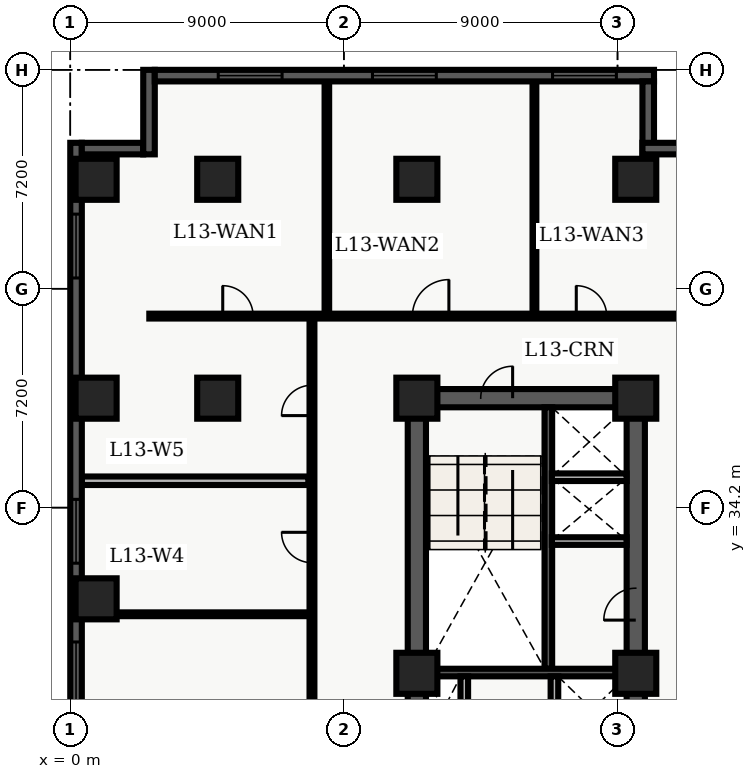
"""IFC4 building model, lengths in metres.
Left out: names, types, materials, properties, quantities, classifications, styles, units other than length and angle.
Written with IfcOpenShell. Run it as: python <this file> out.ifc"""

import sys

from ifc_helpers import new_model, entity, si_unit, converted_unit, direction, frame, origin_with_axes, origin_2d_with_axis, place, context, subcontext, project, spatial, polyline, rectangle, outline, extrude, element, fill, save


model = new_model("IFC4")
c1 = context("Model", 3, precision=1e-05, world=origin_with_axes(), true_north=direction((0.0, 1.0)))
c2 = subcontext(c1, "Body", "Model", "MODEL_VIEW")
j1 = project(units=[si_unit("LENGTHUNIT", "METRE"), converted_unit("PLANEANGLEUNIT", "DEGREE", entity("IfcPlaneAngleMeasure", 0.017), si_unit("PLANEANGLEUNIT", "RADIAN"), dimensions=[0, 0, 0, 0, 0, 0, 0])], contexts=[c1])
p1 = place(None, origin_with_axes())
s1 = spatial("IfcSite", under=j1, at=p1, CompositionType="ELEMENT")
p2 = place(p1, origin_with_axes())
s2 = spatial("IfcBuilding", under=s1, at=p2, CompositionType="ELEMENT")
p3 = place(p2, frame((0.0, 0.0, 56.1), z_axis=(0.0, 0.0, 1.0), x_axis=(1.0, 0.0, 0.0)))
s3 = spatial("IfcBuildingStorey", under=s2, at=p3, CompositionType="ELEMENT", Elevation=56.1)
p4 = place(p3, frame((11.4, 10.8, 0.0), z_axis=(0.0, 0.0, 1.0), x_axis=(0.0, 1.0, 0.0)))
e1 = element("IfcWall", 1, at=p4, inside=s3, PredefinedType="SHEAR", context=c2, shape_type="SweptSolid", body=[
    extrude(outline(polyline([(0.0, -0.3), (27.0, -0.3), (27.0, 0.3), (0.0, 0.3), (0.0, -0.3)])), origin_with_axes(), (0.0, 0.0, 1.0), 3.66),
])
p5 = place(p3, frame((11.4, 37.8, 0.0), z_axis=(0.0, 0.0, 1.0), x_axis=(1.0, 0.0, 0.0)))
e2 = element("IfcWall", 2, at=p5, inside=s3, PredefinedType="SHEAR", context=c2, shape_type="SweptSolid", body=[
    extrude(outline(polyline([(0.0, -0.3), (7.2, -0.3), (7.2, 0.3), (0.0, 0.3), (0.0, -0.3)])), origin_with_axes(), (0.0, 0.0, 1.0), 3.66),
])
p6 = place(p5, frame((2.625, 0.0, 0.0), z_axis=(0.0, 0.0, 1.0), x_axis=(1.0, 0.0, 0.0)))
e3 = element("IfcOpeningElement", 3, at=p6, cuts=e2, PredefinedType="OPENING", context=c2, shape_type="SweptSolid", body=[
    extrude(rectangle(XDim=1.05, YDim=0.62, at=origin_2d_with_axis()), origin_with_axes(), (0.0, 0.0, 1.0), 2.15),
])
p7 = place(p3, frame((18.6, 24.3, 0.0), z_axis=(0.0, 0.0, 1.0), x_axis=(0.0, 1.0, 0.0)))
e4 = element("IfcWall", 4, at=p7, inside=s3, PredefinedType="SHEAR", context=c2, shape_type="SweptSolid", body=[
    extrude(outline(polyline([(0.0, -0.3), (13.5, -0.3), (13.5, 0.3), (0.0, 0.3), (0.0, -0.3)])), origin_with_axes(), (0.0, 0.0, 1.0), 3.66),
])
p8 = place(p7, frame((6.725, 0.0, 0.0), z_axis=(0.0, 0.0, 1.0), x_axis=(1.0, 0.0, 0.0)))
e5 = element("IfcOpeningElement", 5, at=p8, cuts=e4, PredefinedType="OPENING", context=c2, shape_type="SweptSolid", body=[
    extrude(rectangle(XDim=1.05, YDim=0.62, at=origin_2d_with_axis()), origin_with_axes(), (0.0, 0.0, 1.0), 2.15),
])
p9 = place(p3, frame((15.725, 28.9, 0.0), z_axis=(0.0, 0.0, 1.0), x_axis=(0.0, 1.0, 0.0)))
e6 = element("IfcWall", 6, at=p9, inside=s3, PredefinedType="SHEAR", context=c2, shape_type="SweptSolid", body=[
    extrude(outline(polyline([(0.0, -0.125), (8.6, -0.125), (8.6, 0.125), (0.0, 0.125), (0.0, -0.125)])), origin_with_axes(), (0.0, 0.0, 1.0), 3.66),
])
p10 = place(p3, frame((11.7, 28.775, 0.0), z_axis=(0.0, 0.0, 1.0), x_axis=(1.0, 0.0, 0.0)))
e7 = element("IfcWall", 7, at=p10, inside=s3, PredefinedType="SHEAR", context=c2, shape_type="SweptSolid", body=[
    extrude(outline(polyline([(0.0, -0.125), (6.6, -0.125), (6.6, 0.125), (0.0, 0.125), (0.0, -0.125)])), origin_with_axes(), (0.0, 0.0, 1.0), 3.66),
])
for number, where, z_axis, x_axis in (
    (8, (12.96, 26.45, 0.0), (0.0, 0.0, 1.0), (0.0, 1.0, 0.0)),
    (9, (15.925, 26.45, 0.0), (0.0, 0.0, 1.0), (0.0, 1.0, 0.0)),
):
    element("IfcWall", number, at=place(p3, frame(where, z_axis=z_axis, x_axis=x_axis)), inside=s3, PredefinedType="SOLIDWALL", context=c2, shape_type="SweptSolid", body=[
        extrude(outline(polyline([(0.0, -0.125), (2.2, -0.125), (2.2, 0.125), (0.0, 0.125), (0.0, -0.125)])), origin_with_axes(), (0.0, 0.0, 1.0), 2.7),
    ])
for number, where, z_axis, x_axis in (
    (10, (11.4, 28.75, 0.0), (0.0, 0.0, 1.0), (1.0, 0.0, 0.0)),
    (11, (11.4, 37.8, 0.0), (0.0, 0.0, 1.0), (1.0, 0.0, 0.0)),
    (12, (11.4, 45.0, 0.0), (0.0, 0.0, 1.0), (1.0, 0.0, 0.0)),
    (13, (18.6, 28.75, 0.0), (0.0, 0.0, 1.0), (1.0, 0.0, 0.0)),
    (14, (18.6, 37.8, 0.0), (0.0, 0.0, 1.0), (1.0, 0.0, 0.0)),
    (15, (18.6, 45.0, 0.0), (0.0, 0.0, 1.0), (1.0, 0.0, 0.0)),
    (16, (4.85, 37.8, 0.0), (0.0, 0.0, 1.0), (1.0, 0.0, 0.0)),
    (17, (4.85, 45.0, 0.0), (0.0, 0.0, 1.0), (1.0, 0.0, 0.0)),
    (18, (0.85, 31.2, 0.0), (0.0, 0.0, 1.0), (1.0, 0.0, 0.0)),
    (19, (0.85, 37.8, 0.0), (0.0, 0.0, 1.0), (1.0, 0.0, 0.0)),
    (20, (0.85, 45.0, 0.0), (0.0, 0.0, 1.0), (1.0, 0.0, 0.0)),
):
    element("IfcColumn", number, at=place(p3, frame(where, z_axis=z_axis, x_axis=x_axis)), inside=s3, PredefinedType="COLUMN", context=c2, shape_type="SweptSolid", body=[
        extrude(rectangle(XDim=1.35, YDim=1.35, at=origin_2d_with_axis()), origin_with_axes(), (0.0, 0.0, 1.0), 3.9),
    ])
for number, where, z_axis, x_axis in (
    (21, (15.84, 33.1, 0.0), (0.0, 0.0, 1.0), (1.0, 0.0, 0.0)),
    (22, (15.84, 35.2, 0.0), (0.0, 0.0, 1.0), (1.0, 0.0, 0.0)),
):
    element("IfcWall", number, at=place(p3, frame(where, z_axis=z_axis, x_axis=x_axis)), inside=s3, PredefinedType="SOLIDWALL", context=c2, shape_type="SweptSolid", body=[
        extrude(outline(polyline([(0.0, -0.125), (2.46, -0.125), (2.46, 0.125), (0.0, 0.125), (0.0, -0.125)])), origin_with_axes(), (0.0, 0.0, 1.0), 2.7),
    ])
p11 = place(p3, frame((2.6, 40.5, 0.0), z_axis=(0.0, 0.0, 1.0), x_axis=(1.0, 0.0, 0.0)))
e23 = element("IfcWall", 23, at=p11, inside=s3, PredefinedType="PARTITIONING", context=c2, shape_type="SweptSolid", body=[
    extrude(outline(polyline([(0.0, -0.08), (18.65, -0.08), (18.65, 0.08), (0.0, 0.08), (0.0, -0.08)])), origin_with_axes(), (0.0, 0.0, 1.0), 2.7),
])
p12 = place(p11, frame((2.915, 0.0, 0.0), z_axis=(0.0, 0.0, 1.0), x_axis=(1.0, 0.0, 0.0)))
e24 = element("IfcOpeningElement", 24, at=p12, cuts=e23, PredefinedType="OPENING", context=c2, shape_type="SweptSolid", body=[
    extrude(rectangle(XDim=1.0, YDim=0.18, at=origin_2d_with_axis()), origin_with_axes(), (0.0, 0.0, 1.0), 2.15),
])
p13 = place(p11, frame((9.254, 0.0, 0.0), z_axis=(0.0, 0.0, 1.0), x_axis=(1.0, 0.0, 0.0)))
e25 = element("IfcOpeningElement", 25, at=p13, cuts=e23, PredefinedType="OPENING", context=c2, shape_type="SweptSolid", body=[
    extrude(rectangle(XDim=1.2, YDim=0.18, at=origin_2d_with_axis()), origin_with_axes(), (0.0, 0.0, 1.0), 2.2),
])
p14 = place(p11, frame((14.543, 0.0, 0.0), z_axis=(0.0, 0.0, 1.0), x_axis=(1.0, 0.0, 0.0)))
e26 = element("IfcOpeningElement", 26, at=p14, cuts=e23, PredefinedType="OPENING", context=c2, shape_type="SweptSolid", body=[
    extrude(rectangle(XDim=1.0, YDim=0.18, at=origin_2d_with_axis()), origin_with_axes(), (0.0, 0.0, 1.0), 2.15),
])
p15 = place(p3, frame((7.95, 7.8, 0.0), z_axis=(0.0, 0.0, 1.0), x_axis=(0.0, 1.0, 0.0)))
e27 = element("IfcWall", 27, at=p15, inside=s3, PredefinedType="PARTITIONING", context=c2, shape_type="SweptSolid", body=[
    extrude(outline(polyline([(0.0, -0.08), (32.7, -0.08), (32.7, 0.08), (0.0, 0.08), (0.0, -0.08)])), origin_with_axes(), (0.0, 0.0, 1.0), 2.7),
])
p16 = place(p15, frame((3.166, 0.0, 0.0), z_axis=(0.0, 0.0, 1.0), x_axis=(1.0, 0.0, 0.0)))
e28 = element("IfcOpeningElement", 28, at=p16, cuts=e27, PredefinedType="OPENING", context=c2, shape_type="SweptSolid", body=[
    extrude(rectangle(XDim=1.0, YDim=0.18, at=origin_2d_with_axis()), origin_with_axes(), (0.0, 0.0, 1.0), 2.15),
])
p17 = place(p15, frame((9.986, 0.0, 0.0), z_axis=(0.0, 0.0, 1.0), x_axis=(1.0, 0.0, 0.0)))
e29 = element("IfcOpeningElement", 29, at=p17, cuts=e27, PredefinedType="OPENING", context=c2, shape_type="SweptSolid", body=[
    extrude(rectangle(XDim=1.0, YDim=0.18, at=origin_2d_with_axis()), origin_with_axes(), (0.0, 0.0, 1.0), 2.15),
])
p18 = place(p15, frame((18.332, 0.0, 0.0), z_axis=(0.0, 0.0, 1.0), x_axis=(1.0, 0.0, 0.0)))
e30 = element("IfcOpeningElement", 30, at=p18, cuts=e27, PredefinedType="OPENING", context=c2, shape_type="SweptSolid", body=[
    extrude(rectangle(XDim=1.0, YDim=0.18, at=origin_2d_with_axis()), origin_with_axes(), (0.0, 0.0, 1.0), 2.15),
])
p19 = place(p15, frame((25.088, 0.0, 0.0), z_axis=(0.0, 0.0, 1.0), x_axis=(1.0, 0.0, 0.0)))
e31 = element("IfcOpeningElement", 31, at=p19, cuts=e27, PredefinedType="OPENING", context=c2, shape_type="SweptSolid", body=[
    extrude(rectangle(XDim=1.0, YDim=0.18, at=origin_2d_with_axis()), origin_with_axes(), (0.0, 0.0, 1.0), 2.15),
])
p20 = place(p15, frame((29.927, 0.0, 0.0), z_axis=(0.0, 0.0, 1.0), x_axis=(1.0, 0.0, 0.0)))
e32 = element("IfcOpeningElement", 32, at=p20, cuts=e27, PredefinedType="OPENING", context=c2, shape_type="SweptSolid", body=[
    extrude(rectangle(XDim=1.0, YDim=0.18, at=origin_2d_with_axis()), origin_with_axes(), (0.0, 0.0, 1.0), 2.15),
])
p21 = place(p3, frame((0.375, 30.692, 0.0), z_axis=(0.0, 0.0, 1.0), x_axis=(1.0, 0.0, 0.0)))
e33 = element("IfcWall", 33, at=p21, inside=s3, PredefinedType="PARTITIONING", context=c2, shape_type="SweptSolid", body=[
    extrude(outline(polyline([(0.0, -0.062), (7.455, -0.062), (7.455, 0.062), (0.0, 0.062), (0.0, -0.062)])), origin_with_axes(), (0.0, 0.0, 1.0), 2.7),
])
p22 = place(p3, frame((0.375, 35.084, 0.0), z_axis=(0.0, 0.0, 1.0), x_axis=(1.0, 0.0, 0.0)))
e34 = element("IfcWall", 34, at=p22, inside=s3, PredefinedType="PARTITIONING", context=c2, shape_type="SweptSolid", body=[
    extrude(outline(polyline([(0.0, -0.14), (7.455, -0.14), (7.455, 0.14), (0.0, 0.14), (0.0, -0.14)])), origin_with_axes(), (0.0, 0.0, 1.0), 2.7),
])
p23 = place(p3, frame((8.44, 40.6, 0.0), z_axis=(0.0, 0.0, 1.0), x_axis=(0.0, 1.0, 0.0)))
e35 = element("IfcWall", 35, at=p23, inside=s3, PredefinedType="PARTITIONING", context=c2, shape_type="SweptSolid", body=[
    extrude(outline(polyline([(0.0, -0.075), (7.64, -0.075), (7.64, 0.075), (0.0, 0.075), (0.0, -0.075)])), origin_with_axes(), (0.0, 0.0, 1.0), 2.7),
])
p24 = place(p3, frame((15.267, 40.6, 0.0), z_axis=(0.0, 0.0, 1.0), x_axis=(0.0, 1.0, 0.0)))
e36 = element("IfcWall", 36, at=p24, inside=s3, PredefinedType="PARTITIONING", context=c2, shape_type="SweptSolid", body=[
    extrude(outline(polyline([(0.0, -0.062), (7.64, -0.062), (7.64, 0.062), (0.0, 0.062), (0.0, -0.062)])), origin_with_axes(), (0.0, 0.0, 1.0), 2.7),
])
p25 = place(p3, frame((0.19, 2.78, 0.0), z_axis=(0.0, 0.0, 1.0), x_axis=(0.0, 1.0, 0.0)))
e37 = element("IfcWall", 37, at=p25, inside=s3, PredefinedType="SOLIDWALL", context=c2, shape_type="SweptSolid", body=[
    extrude(outline(polyline([(0.0, -0.19), (43.42, -0.19), (43.42, 0.19), (0.0, 0.19), (0.0, -0.19)])), origin_with_axes(), (0.0, 0.0, 1.0), 3.66),
])
p26 = place(p25, frame((2.946, 0.0, 0.45), z_axis=(0.0, 0.0, 1.0), x_axis=(1.0, 0.0, 0.0)))
e38 = element("IfcOpeningElement", 38, at=p26, cuts=e37, PredefinedType="OPENING", context=c2, shape_type="SweptSolid", body=[
    extrude(rectangle(XDim=2.1, YDim=0.4, at=origin_2d_with_axis()), origin_with_axes(), (0.0, 0.0, 1.0), 2.2),
])
p27 = place(p25, frame((12.778, 0.0, 0.45), z_axis=(0.0, 0.0, 1.0), x_axis=(1.0, 0.0, 0.0)))
e39 = element("IfcOpeningElement", 39, at=p27, cuts=e37, PredefinedType="OPENING", context=c2, shape_type="SweptSolid", body=[
    extrude(rectangle(XDim=2.1, YDim=0.4, at=origin_2d_with_axis()), origin_with_axes(), (0.0, 0.0, 1.0), 2.2),
])
p28 = place(p25, frame((21.71, 0.0, 0.45), z_axis=(0.0, 0.0, 1.0), x_axis=(1.0, 0.0, 0.0)))
e40 = element("IfcOpeningElement", 40, at=p28, cuts=e37, PredefinedType="OPENING", context=c2, shape_type="SweptSolid", body=[
    extrude(rectangle(XDim=2.1, YDim=0.4, at=origin_2d_with_axis()), origin_with_axes(), (0.0, 0.0, 1.0), 2.2),
])
p29 = place(p25, frame((25.951, 0.0, 0.45), z_axis=(0.0, 0.0, 1.0), x_axis=(1.0, 0.0, 0.0)))
e41 = element("IfcOpeningElement", 41, at=p29, cuts=e37, PredefinedType="OPENING", context=c2, shape_type="SweptSolid", body=[
    extrude(rectangle(XDim=2.1, YDim=0.4, at=origin_2d_with_axis()), origin_with_axes(), (0.0, 0.0, 1.0), 2.2),
])
p30 = place(p25, frame((30.642, 0.0, 0.45), z_axis=(0.0, 0.0, 1.0), x_axis=(1.0, 0.0, 0.0)))
e42 = element("IfcOpeningElement", 42, at=p30, cuts=e37, PredefinedType="OPENING", context=c2, shape_type="SweptSolid", body=[
    extrude(rectangle(XDim=2.1, YDim=0.4, at=origin_2d_with_axis()), origin_with_axes(), (0.0, 0.0, 1.0), 2.2),
])
p31 = place(p25, frame((40.024, 0.0, 0.45), z_axis=(0.0, 0.0, 1.0), x_axis=(1.0, 0.0, 0.0)))
e43 = element("IfcOpeningElement", 43, at=p31, cuts=e37, PredefinedType="OPENING", context=c2, shape_type="SweptSolid", body=[
    extrude(rectangle(XDim=2.1, YDim=0.4, at=origin_2d_with_axis()), origin_with_axes(), (0.0, 0.0, 1.0), 2.2),
])
p32 = place(p3, frame((0.38, 46.01, 0.0), z_axis=(0.0, 0.0, 1.0), x_axis=(1.0, 0.0, 0.0)))
e44 = element("IfcWall", 44, at=p32, inside=s3, PredefinedType="SOLIDWALL", context=c2, shape_type="SweptSolid", body=[
    extrude(outline(polyline([(0.0, -0.19), (2.02, -0.19), (2.02, 0.19), (0.0, 0.19), (0.0, -0.19)])), origin_with_axes(), (0.0, 0.0, 1.0), 3.66),
])
p33 = place(p3, frame((2.59, 45.82, 0.0), z_axis=(0.0, 0.0, 1.0), x_axis=(0.0, 1.0, 0.0)))
e45 = element("IfcWall", 45, at=p33, inside=s3, PredefinedType="SOLIDWALL", context=c2, shape_type="SweptSolid", body=[
    extrude(outline(polyline([(0.0, -0.19), (2.78, -0.19), (2.78, 0.19), (0.0, 0.19), (0.0, -0.19)])), origin_with_axes(), (0.0, 0.0, 1.0), 3.66),
])
p34 = place(p3, frame((2.78, 48.41, 0.0), z_axis=(0.0, 0.0, 1.0), x_axis=(1.0, 0.0, 0.0)))
e46 = element("IfcWall", 46, at=p34, inside=s3, PredefinedType="SOLIDWALL", context=c2, shape_type="SweptSolid", body=[
    extrude(outline(polyline([(0.0, -0.19), (16.42, -0.19), (16.42, 0.19), (0.0, 0.19), (0.0, -0.19)])), origin_with_axes(), (0.0, 0.0, 1.0), 3.66),
])
p35 = place(p34, frame((3.137, 0.0, 0.45), z_axis=(0.0, 0.0, 1.0), x_axis=(1.0, 0.0, 0.0)))
e47 = element("IfcOpeningElement", 47, at=p35, cuts=e46, PredefinedType="OPENING", context=c2, shape_type="SweptSolid", body=[
    extrude(rectangle(XDim=2.1, YDim=0.4, at=origin_2d_with_axis()), origin_with_axes(), (0.0, 0.0, 1.0), 2.2),
])
p36 = place(p34, frame((8.21, 0.0, 0.45), z_axis=(0.0, 0.0, 1.0), x_axis=(1.0, 0.0, 0.0)))
e48 = element("IfcOpeningElement", 48, at=p36, cuts=e46, PredefinedType="OPENING", context=c2, shape_type="SweptSolid", body=[
    extrude(rectangle(XDim=2.1, YDim=0.4, at=origin_2d_with_axis()), origin_with_axes(), (0.0, 0.0, 1.0), 2.2),
])
p37 = place(p34, frame((14.133, 0.0, 0.45), z_axis=(0.0, 0.0, 1.0), x_axis=(1.0, 0.0, 0.0)))
e49 = element("IfcOpeningElement", 49, at=p37, cuts=e46, PredefinedType="OPENING", context=c2, shape_type="SweptSolid", body=[
    extrude(rectangle(XDim=2.1, YDim=0.4, at=origin_2d_with_axis()), origin_with_axes(), (0.0, 0.0, 1.0), 2.2),
])
p38 = place(p3, frame((19.01, 48.22, 0.0), z_axis=(0.0, 0.0, 1.0), x_axis=(0.0, -1.0, 0.0)))
e50 = element("IfcWall", 50, at=p38, inside=s3, PredefinedType="SOLIDWALL", context=c2, shape_type="SweptSolid", body=[
    extrude(outline(polyline([(0.0, -0.19), (2.56, -0.19), (2.56, 0.19), (0.0, 0.19), (0.0, -0.19)])), origin_with_axes(), (0.0, 0.0, 1.0), 3.66),
])
p39 = place(p3, frame((18.82, 46.01, 0.0), z_axis=(0.0, 0.0, 1.0), x_axis=(1.0, 0.0, 0.0)))
e51 = element("IfcWall", 51, at=p39, inside=s3, PredefinedType="SOLIDWALL", context=c2, shape_type="SweptSolid", body=[
    extrude(outline(polyline([(0.0, -0.19), (2.78, -0.19), (2.78, 0.19), (0.0, 0.19), (0.0, -0.19)])), origin_with_axes(), (0.0, 0.0, 1.0), 3.66),
])
p40 = place(p5, frame((2.625, 0.0, 0.0), z_axis=(0.0, 0.0, 1.0), x_axis=(1.0, 0.0, 0.0)))
e52 = element("IfcDoor", 52, at=p40, inside=s3, OperationType="SINGLE_SWING_RIGHT", PredefinedType="DOOR", context=c2, shape_type="SweptSolid", body=[
    extrude(rectangle(XDim=1.05, YDim=0.09, at=origin_2d_with_axis()), origin_with_axes(), (0.0, 0.0, 1.0), 2.15),
])
fill(e3, e52)
p41 = place(p7, frame((6.725, 0.0, 0.0), z_axis=(0.0, 0.0, 1.0), x_axis=(1.0, 0.0, 0.0)))
e53 = element("IfcDoor", 53, at=p41, inside=s3, OperationType="SINGLE_SWING_LEFT", PredefinedType="DOOR", context=c2, shape_type="SweptSolid", body=[
    extrude(rectangle(XDim=1.05, YDim=0.09, at=origin_2d_with_axis()), origin_with_axes(), (0.0, 0.0, 1.0), 2.15),
])
fill(e5, e53)
p42 = place(p15, frame((25.088, 0.0, 0.0), z_axis=(0.0, 0.0, 1.0), x_axis=(1.0, 0.0, 0.0)))
e54 = element("IfcDoor", 54, at=p42, inside=s3, OperationType="SINGLE_SWING_RIGHT", PredefinedType="DOOR", context=c2, shape_type="SweptSolid", body=[
    extrude(rectangle(XDim=1.0, YDim=0.09, at=origin_2d_with_axis()), origin_with_axes(), (0.0, 0.0, 1.0), 2.15),
])
fill(e31, e54)
p43 = place(p15, frame((29.927, 0.0, 0.0), z_axis=(0.0, 0.0, 1.0), x_axis=(1.0, 0.0, 0.0)))
e55 = element("IfcDoor", 55, at=p43, inside=s3, OperationType="SINGLE_SWING_LEFT", PredefinedType="DOOR", context=c2, shape_type="SweptSolid", body=[
    extrude(rectangle(XDim=1.0, YDim=0.09, at=origin_2d_with_axis()), origin_with_axes(), (0.0, 0.0, 1.0), 2.15),
])
fill(e32, e55)
p44 = place(p11, frame((2.915, 0.0, 0.0), z_axis=(0.0, 0.0, 1.0), x_axis=(1.0, 0.0, 0.0)))
e56 = element("IfcDoor", 56, at=p44, inside=s3, OperationType="SINGLE_SWING_LEFT", PredefinedType="DOOR", context=c2, shape_type="SweptSolid", body=[
    extrude(rectangle(XDim=1.0, YDim=0.09, at=origin_2d_with_axis()), origin_with_axes(), (0.0, 0.0, 1.0), 2.15),
])
fill(e24, e56)
p45 = place(p11, frame((9.254, 0.0, 0.0), z_axis=(0.0, 0.0, 1.0), x_axis=(1.0, 0.0, 0.0)))
e57 = element("IfcDoor", 57, at=p45, inside=s3, OperationType="SINGLE_SWING_RIGHT", PredefinedType="DOOR", context=c2, shape_type="SweptSolid", body=[
    extrude(rectangle(XDim=1.2, YDim=0.09, at=origin_2d_with_axis()), origin_with_axes(), (0.0, 0.0, 1.0), 2.2),
])
fill(e25, e57)
p46 = place(p11, frame((14.543, 0.0, 0.0), z_axis=(0.0, 0.0, 1.0), x_axis=(1.0, 0.0, 0.0)))
e58 = element("IfcDoor", 58, at=p46, inside=s3, OperationType="SINGLE_SWING_LEFT", PredefinedType="DOOR", context=c2, shape_type="SweptSolid", body=[
    extrude(rectangle(XDim=1.0, YDim=0.09, at=origin_2d_with_axis()), origin_with_axes(), (0.0, 0.0, 1.0), 2.15),
])
fill(e26, e58)
p47 = place(p25, frame((25.951, 0.0, 0.45), z_axis=(0.0, 0.0, 1.0), x_axis=(1.0, 0.0, 0.0)))
e59 = element("IfcWindow", 59, at=p47, inside=s3, PredefinedType="WINDOW", context=c2, shape_type="SweptSolid", body=[
    extrude(rectangle(XDim=2.1, YDim=0.09, at=origin_2d_with_axis()), origin_with_axes(), (0.0, 0.0, 1.0), 2.2),
])
fill(e41, e59)
p48 = place(p25, frame((30.642, 0.0, 0.45), z_axis=(0.0, 0.0, 1.0), x_axis=(1.0, 0.0, 0.0)))
e60 = element("IfcWindow", 60, at=p48, inside=s3, PredefinedType="WINDOW", context=c2, shape_type="SweptSolid", body=[
    extrude(rectangle(XDim=2.1, YDim=0.09, at=origin_2d_with_axis()), origin_with_axes(), (0.0, 0.0, 1.0), 2.2),
])
fill(e42, e60)
p49 = place(p25, frame((40.024, 0.0, 0.45), z_axis=(0.0, 0.0, 1.0), x_axis=(1.0, 0.0, 0.0)))
e61 = element("IfcWindow", 61, at=p49, inside=s3, PredefinedType="WINDOW", context=c2, shape_type="SweptSolid", body=[
    extrude(rectangle(XDim=2.1, YDim=0.09, at=origin_2d_with_axis()), origin_with_axes(), (0.0, 0.0, 1.0), 2.2),
])
fill(e43, e61)
p50 = place(p34, frame((3.137, 0.0, 0.45), z_axis=(0.0, 0.0, 1.0), x_axis=(1.0, 0.0, 0.0)))
e62 = element("IfcWindow", 62, at=p50, inside=s3, PredefinedType="WINDOW", context=c2, shape_type="SweptSolid", body=[
    extrude(rectangle(XDim=2.1, YDim=0.09, at=origin_2d_with_axis()), origin_with_axes(), (0.0, 0.0, 1.0), 2.2),
])
fill(e47, e62)
p51 = place(p34, frame((8.21, 0.0, 0.45), z_axis=(0.0, 0.0, 1.0), x_axis=(1.0, 0.0, 0.0)))
e63 = element("IfcWindow", 63, at=p51, inside=s3, PredefinedType="WINDOW", context=c2, shape_type="SweptSolid", body=[
    extrude(rectangle(XDim=2.1, YDim=0.09, at=origin_2d_with_axis()), origin_with_axes(), (0.0, 0.0, 1.0), 2.2),
])
fill(e48, e63)
p52 = place(p34, frame((14.133, 0.0, 0.45), z_axis=(0.0, 0.0, 1.0), x_axis=(1.0, 0.0, 0.0)))
e64 = element("IfcWindow", 64, at=p52, inside=s3, PredefinedType="WINDOW", context=c2, shape_type="SweptSolid", body=[
    extrude(rectangle(XDim=2.1, YDim=0.09, at=origin_2d_with_axis()), origin_with_axes(), (0.0, 0.0, 1.0), 2.2),
])
fill(e49, e64)
save(model, sys.argv[1])
